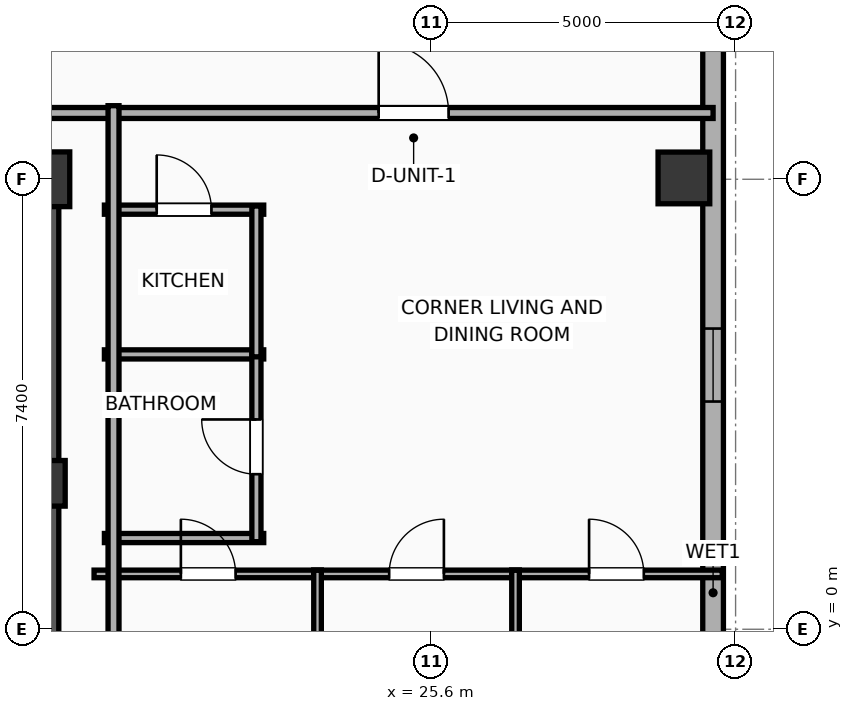
"""IFC4 building model, lengths in metres.
Left out: names, types, materials, properties, quantities, classifications, styles, units other than length and angle.
Written with IfcOpenShell. Run it as: python <this file> out.ifc"""

import sys

from ifc_helpers import new_model, si_unit, direction, frame, frame_2d, origin, origin_2d, place, context, subcontext, project, spatial, rectangle, hollow_rectangle, extrude, element, fill, save


model = new_model("IFC4")
c1 = context("Model", 3, precision=1e-05, world=origin(), true_north=direction((0.0, 1.0)))
c2 = subcontext(c1, "Body", "Model", "MODEL_VIEW")
j1 = project(units=[si_unit("LENGTHUNIT", "METRE"), si_unit("PLANEANGLEUNIT", "RADIAN")], contexts=[c1])
p1 = place(None, origin())
s1 = spatial("IfcSite", under=j1, at=p1, CompositionType="ELEMENT")
p2 = place(p1, origin())
s2 = spatial("IfcBuilding", under=s1, at=p2, CompositionType="ELEMENT")
p3 = place(p2, frame((0.0, 0.0, 235.3)))
s3 = spatial("IfcBuildingStorey", under=s2, at=p3, CompositionType="ELEMENT", Elevation=235.3)
p4 = place(p3, frame((19.2, 2.4, 0.0), z_axis=(0.0, 0.0, 1.0), x_axis=(1.0, 0.0, 0.0)))
e1 = element("IfcColumn", 1, at=p4, inside=s3, PredefinedType="COLUMN", context=c2, shape_type="SweptSolid", body=[
    extrude(rectangle(XDim=0.75, YDim=0.75, at=origin_2d()), origin(), (0.0, 0.0, 1.0), 3.9),
])
p5 = place(p3, frame((19.2, 7.4, 0.0), z_axis=(0.0, 0.0, 1.0), x_axis=(1.0, 0.0, 0.0)))
e2 = element("IfcColumn", 2, at=p5, inside=s3, PredefinedType="COLUMN", context=c2, shape_type="SweptSolid", body=[
    extrude(rectangle(XDim=0.9, YDim=0.9, at=origin_2d()), origin(), (0.0, 0.0, 1.0), 3.9),
])
p6 = place(p3, frame((12.175, 7.4, 0.0), z_axis=(0.0, 0.0, 1.0), x_axis=(1.0, 0.0, 0.0)))
e3 = element("IfcWall", 3, at=p6, inside=s3, PredefinedType="SHEAR", context=c2, shape_type="SweptSolid", body=[
    extrude(rectangle(XDim=7.25, YDim=0.45, at=frame_2d((3.625, 0.0))), origin(), (0.0, 0.0, 1.0), 3.65),
])
p7 = place(p3, frame((19.145, -7.4, 0.0), z_axis=(0.0, 0.0, 1.0), x_axis=(0.0, 1.0, 0.0)))
e4 = element("IfcWall", 4, at=p7, inside=s3, PredefinedType="SHEAR", context=c2, shape_type="SweptSolid", body=[
    extrude(rectangle(XDim=14.8, YDim=0.65, at=frame_2d((7.4, 0.0))), origin(), (0.0, 0.0, 1.0), 3.65),
])
p8 = place(p3, frame((29.75, 7.422, 0.0), z_axis=(0.0, 0.0, 1.0), x_axis=(1.0, 0.0, 0.0)))
e5 = element("IfcColumn", 5, at=p8, inside=s3, PredefinedType="COLUMN", context=c2, shape_type="SweptSolid", body=[
    extrude(hollow_rectangle(XDim=0.85, YDim=0.85, WallThickness=0.028, at=origin_2d()), origin(), (0.0, 0.0, 1.0), 3.9),
])
p9 = place(p3, frame((30.23, 16.583, 0.0), z_axis=(0.0, 0.0, 1.0), x_axis=(0.0, -1.0, 0.0)))
e6 = element("IfcWall", 6, at=p9, inside=s3, PredefinedType="ELEMENTEDWALL", context=c2, shape_type="SweptSolid", body=[
    extrude(rectangle(XDim=31.967, YDim=0.34, at=frame_2d((15.983, 0.0))), origin(), (0.0, 0.0, 1.0), 3.65),
])
p10 = place(p9, frame((11.638, 0.0, 0.75)))
e7 = element("IfcOpeningElement", 7, at=p10, cuts=e6, PredefinedType="OPENING", context=c2, shape_type="SweptSolid", body=[
    extrude(rectangle(XDim=1.2, YDim=2.05, at=frame_2d((0.6, 1.025))), frame((0.0, 0.18, 0.0), z_axis=(0.0, -1.0, 0.0), x_axis=(1.0, 0.0, 0.0)), (0.0, 0.0, 1.0), 0.36),
])
p11 = place(p9, frame((20.188, 0.0, 0.75)))
e8 = element("IfcOpeningElement", 8, at=p11, cuts=e6, PredefinedType="OPENING", context=c2, shape_type="SweptSolid", body=[
    extrude(rectangle(XDim=1.2, YDim=2.05, at=frame_2d((0.6, 1.025))), frame((0.0, 0.18, 0.0), z_axis=(0.0, -1.0, 0.0), x_axis=(1.0, 0.0, 0.0)), (0.0, 0.0, 1.0), 0.36),
])
p12 = place(p3, frame((9.88, 8.49, 0.0), z_axis=(0.0, 0.0, 1.0), x_axis=(1.0, 0.0, 0.0)))
e9 = element("IfcWall", 9, at=p12, inside=s3, PredefinedType="PARTITIONING", context=c2, shape_type="SweptSolid", body=[
    extrude(rectangle(XDim=20.35, YDim=0.18, at=frame_2d((10.175, 0.0))), origin(), (0.0, 0.0, 1.0), 3.65),
])
p13 = place(p12, frame((14.85, 0.0, 0.0)))
e10 = element("IfcOpeningElement", 10, at=p13, cuts=e9, PredefinedType="OPENING", context=c2, shape_type="SweptSolid", body=[
    extrude(rectangle(XDim=1.15, YDim=2.05, at=frame_2d((0.575, 1.025))), frame((0.0, 0.1, 0.0), z_axis=(0.0, -1.0, 0.0), x_axis=(1.0, 0.0, 0.0)), (0.0, 0.0, 1.0), 0.2),
])
p14 = place(p3, frame((20.22, 6.9, 0.0), z_axis=(0.0, 0.0, 1.0), x_axis=(1.0, 0.0, 0.0)))
e11 = element("IfcWall", 11, at=p14, inside=s3, PredefinedType="PLUMBINGWALL", context=c2, shape_type="SweptSolid", body=[
    extrude(rectangle(XDim=2.62, YDim=0.15, at=frame_2d((1.31, 0.0))), origin(), (0.0, 0.0, 1.0), 3.65),
])
p15 = place(p14, frame((0.86, 0.0, 0.0)))
e12 = element("IfcOpeningElement", 12, at=p15, cuts=e11, PredefinedType="OPENING", context=c2, shape_type="SweptSolid", body=[
    extrude(rectangle(XDim=0.9, YDim=2.05, at=frame_2d((0.45, 1.025))), frame((0.0, 0.085, 0.0), z_axis=(0.0, -1.0, 0.0), x_axis=(1.0, 0.0, 0.0)), (0.0, 0.0, 1.0), 0.17),
])
for number, where, z_axis, x_axis in (
    (13, (20.22, 4.52, 0.0), (0.0, 0.0, 1.0), (1.0, 0.0, 0.0)),
    (14, (20.22, 1.5, 0.0), (0.0, 0.0, 1.0), (1.0, 0.0, 0.0)),
):
    element("IfcWall", number, at=place(p3, frame(where, z_axis=z_axis, x_axis=x_axis)), inside=s3, PredefinedType="PLUMBINGWALL", context=c2, shape_type="SweptSolid", body=[
        extrude(rectangle(XDim=2.62, YDim=0.15, at=frame_2d((1.31, 0.0))), origin(), (0.0, 0.0, 1.0), 3.65),
    ])
p16 = place(p3, frame((22.72, 1.44, 0.0), z_axis=(0.0, 0.0, 1.0), x_axis=(0.0, 1.0, 0.0)))
e15 = element("IfcWall", 15, at=p16, inside=s3, PredefinedType="PLUMBINGWALL", context=c2, shape_type="SweptSolid", body=[
    extrude(rectangle(XDim=3.12, YDim=0.15, at=frame_2d((1.56, 0.0))), origin(), (0.0, 0.0, 1.0), 3.65),
])
p17 = place(p16, frame((1.11, 0.0, 0.0)))
e16 = element("IfcOpeningElement", 16, at=p17, cuts=e15, PredefinedType="OPENING", context=c2, shape_type="SweptSolid", body=[
    extrude(rectangle(XDim=0.9, YDim=2.05, at=frame_2d((0.45, 1.025))), frame((0.0, 0.085, 0.0), z_axis=(0.0, -1.0, 0.0), x_axis=(1.0, 0.0, 0.0)), (0.0, 0.0, 1.0), 0.17),
])
p18 = place(p3, frame((22.72, 4.48, 0.0), z_axis=(0.0, 0.0, 1.0), x_axis=(0.0, 1.0, 0.0)))
e17 = element("IfcWall", 17, at=p18, inside=s3, PredefinedType="PLUMBINGWALL", context=c2, shape_type="SweptSolid", body=[
    extrude(rectangle(XDim=2.48, YDim=0.15, at=frame_2d((1.24, 0.0))), origin(), (0.0, 0.0, 1.0), 3.65),
])
p19 = place(p3, frame((20.05, 0.91, 0.0), z_axis=(0.0, 0.0, 1.0), x_axis=(1.0, 0.0, 0.0)))
e18 = element("IfcWall", 18, at=p19, inside=s3, PredefinedType="PARTITIONING", context=c2, shape_type="SweptSolid", body=[
    extrude(rectangle(XDim=3.738, YDim=0.125, at=frame_2d((1.869, 0.0))), origin(), (0.0, 0.0, 1.0), 3.65),
])
p20 = place(p19, frame((1.427, 0.0, 0.0)))
e19 = element("IfcOpeningElement", 19, at=p20, cuts=e18, PredefinedType="OPENING", context=c2, shape_type="SweptSolid", body=[
    extrude(rectangle(XDim=0.9, YDim=2.05, at=frame_2d((0.45, 1.025))), frame((0.0, 0.073, 0.0), z_axis=(0.0, -1.0, 0.0), x_axis=(1.0, 0.0, 0.0)), (0.0, 0.0, 1.0), 0.145),
])
p21 = place(p3, frame((23.663, 0.91, 0.0), z_axis=(0.0, 0.0, 1.0), x_axis=(1.0, 0.0, 0.0)))
e20 = element("IfcWall", 20, at=p21, inside=s3, PredefinedType="PARTITIONING", context=c2, shape_type="SweptSolid", body=[
    extrude(rectangle(XDim=3.381, YDim=0.125, at=frame_2d((1.69, 0.0))), origin(), (0.0, 0.0, 1.0), 3.65),
])
p22 = place(p21, frame((1.24, 0.0, 0.0)))
e21 = element("IfcOpeningElement", 21, at=p22, cuts=e20, PredefinedType="OPENING", context=c2, shape_type="SweptSolid", body=[
    extrude(rectangle(XDim=0.9, YDim=2.05, at=frame_2d((0.45, 1.025))), frame((0.0, 0.073, 0.0), z_axis=(0.0, -1.0, 0.0), x_axis=(1.0, 0.0, 0.0)), (0.0, 0.0, 1.0), 0.145),
])
p23 = place(p3, frame((26.918, 0.91, 0.0), z_axis=(0.0, 0.0, 1.0), x_axis=(1.0, 0.0, 0.0)))
e22 = element("IfcWall", 22, at=p23, inside=s3, PredefinedType="PARTITIONING", context=c2, shape_type="SweptSolid", body=[
    extrude(rectangle(XDim=3.461, YDim=0.125, at=frame_2d((1.731, 0.0))), origin(), (0.0, 0.0, 1.0), 3.65),
])
p24 = place(p23, frame((1.272, 0.0, 0.0)))
e23 = element("IfcOpeningElement", 23, at=p24, cuts=e22, PredefinedType="OPENING", context=c2, shape_type="SweptSolid", body=[
    extrude(rectangle(XDim=0.9, YDim=2.05, at=frame_2d((0.45, 1.025))), frame((0.0, 0.073, 0.0), z_axis=(0.0, -1.0, 0.0), x_axis=(1.0, 0.0, 0.0)), (0.0, 0.0, 1.0), 0.145),
])
for number, where, z_axis, x_axis in (
    (24, (26.981, -8.81, 0.0), (0.0, 0.0, 1.0), (0.0, 1.0, 0.0)),
    (25, (23.725, -8.81, 0.0), (0.0, 0.0, 1.0), (0.0, 1.0, 0.0)),
):
    element("IfcWall", number, at=place(p3, frame(where, z_axis=z_axis, x_axis=x_axis)), inside=s3, PredefinedType="PARTITIONING", context=c2, shape_type="SweptSolid", body=[
        extrude(rectangle(XDim=9.78, YDim=0.125, at=frame_2d((4.89, 0.0))), origin(), (0.0, 0.0, 1.0), 3.65),
    ])
p25 = place(p3, frame((20.37, -8.61, 0.0), z_axis=(0.0, 0.0, 1.0), x_axis=(0.0, 1.0, 0.0)))
e26 = element("IfcWall", 26, at=p25, inside=s3, PredefinedType="PARTITIONING", context=c2, shape_type="SweptSolid", body=[
    extrude(rectangle(XDim=17.22, YDim=0.18, at=frame_2d((8.61, 0.0))), origin(), (0.0, 0.0, 1.0), 3.65),
])
p26 = place(p10, origin())
e27 = element("IfcWindow", 27, at=p26, inside=s3, PartitioningType="SINGLE_PANEL", PredefinedType="WINDOW", context=c2, shape_type="SweptSolid", body=[
    extrude(rectangle(XDim=1.2, YDim=2.05, at=frame_2d((0.6, 1.025))), frame((0.0, 0.03, 0.0), z_axis=(0.0, -1.0, 0.0), x_axis=(1.0, 0.0, 0.0)), (0.0, 0.0, 1.0), 0.06),
])
fill(e7, e27)
p27 = place(p13, origin())
e28 = element("IfcDoor", 28, at=p27, inside=s3, OperationType="SINGLE_SWING_LEFT", PredefinedType="DOOR", context=c2, shape_type="SweptSolid", body=[
    extrude(rectangle(XDim=1.15, YDim=2.05, at=frame_2d((0.575, 1.025))), frame((0.0, 0.025, 0.0), z_axis=(0.0, -1.0, 0.0), x_axis=(1.0, 0.0, 0.0)), (0.0, 0.0, 1.0), 0.05),
])
fill(e10, e28)
p28 = place(p15, origin())
e29 = element("IfcDoor", 29, at=p28, inside=s3, OperationType="SINGLE_SWING_LEFT", PredefinedType="DOOR", context=c2, shape_type="SweptSolid", body=[
    extrude(rectangle(XDim=0.9, YDim=2.05, at=frame_2d((0.45, 1.025))), frame((0.0, 0.025, 0.0), z_axis=(0.0, -1.0, 0.0), x_axis=(1.0, 0.0, 0.0)), (0.0, 0.0, 1.0), 0.05),
])
fill(e12, e29)
p29 = place(p17, origin())
e30 = element("IfcDoor", 30, at=p29, inside=s3, OperationType="SINGLE_SWING_RIGHT", PredefinedType="DOOR", context=c2, shape_type="SweptSolid", body=[
    extrude(rectangle(XDim=0.9, YDim=2.05, at=frame_2d((0.45, 1.025))), frame((0.0, 0.025, 0.0), z_axis=(0.0, -1.0, 0.0), x_axis=(1.0, 0.0, 0.0)), (0.0, 0.0, 1.0), 0.05),
])
fill(e16, e30)
p30 = place(p20, origin())
e31 = element("IfcDoor", 31, at=p30, inside=s3, OperationType="SINGLE_SWING_LEFT", PredefinedType="DOOR", context=c2, shape_type="SweptSolid", body=[
    extrude(rectangle(XDim=0.9, YDim=2.05, at=frame_2d((0.45, 1.025))), frame((0.0, 0.025, 0.0), z_axis=(0.0, -1.0, 0.0), x_axis=(1.0, 0.0, 0.0)), (0.0, 0.0, 1.0), 0.05),
])
fill(e19, e31)
p31 = place(p22, origin())
e32 = element("IfcDoor", 32, at=p31, inside=s3, OperationType="SINGLE_SWING_RIGHT", PredefinedType="DOOR", context=c2, shape_type="SweptSolid", body=[
    extrude(rectangle(XDim=0.9, YDim=2.05, at=frame_2d((0.45, 1.025))), frame((0.0, 0.025, 0.0), z_axis=(0.0, -1.0, 0.0), x_axis=(1.0, 0.0, 0.0)), (0.0, 0.0, 1.0), 0.05),
])
fill(e21, e32)
p32 = place(p24, origin())
e33 = element("IfcDoor", 33, at=p32, inside=s3, OperationType="SINGLE_SWING_LEFT", PredefinedType="DOOR", context=c2, shape_type="SweptSolid", body=[
    extrude(rectangle(XDim=0.9, YDim=2.05, at=frame_2d((0.45, 1.025))), frame((0.0, 0.025, 0.0), z_axis=(0.0, -1.0, 0.0), x_axis=(1.0, 0.0, 0.0)), (0.0, 0.0, 1.0), 0.05),
])
fill(e23, e33)
save(model, sys.argv[1])
